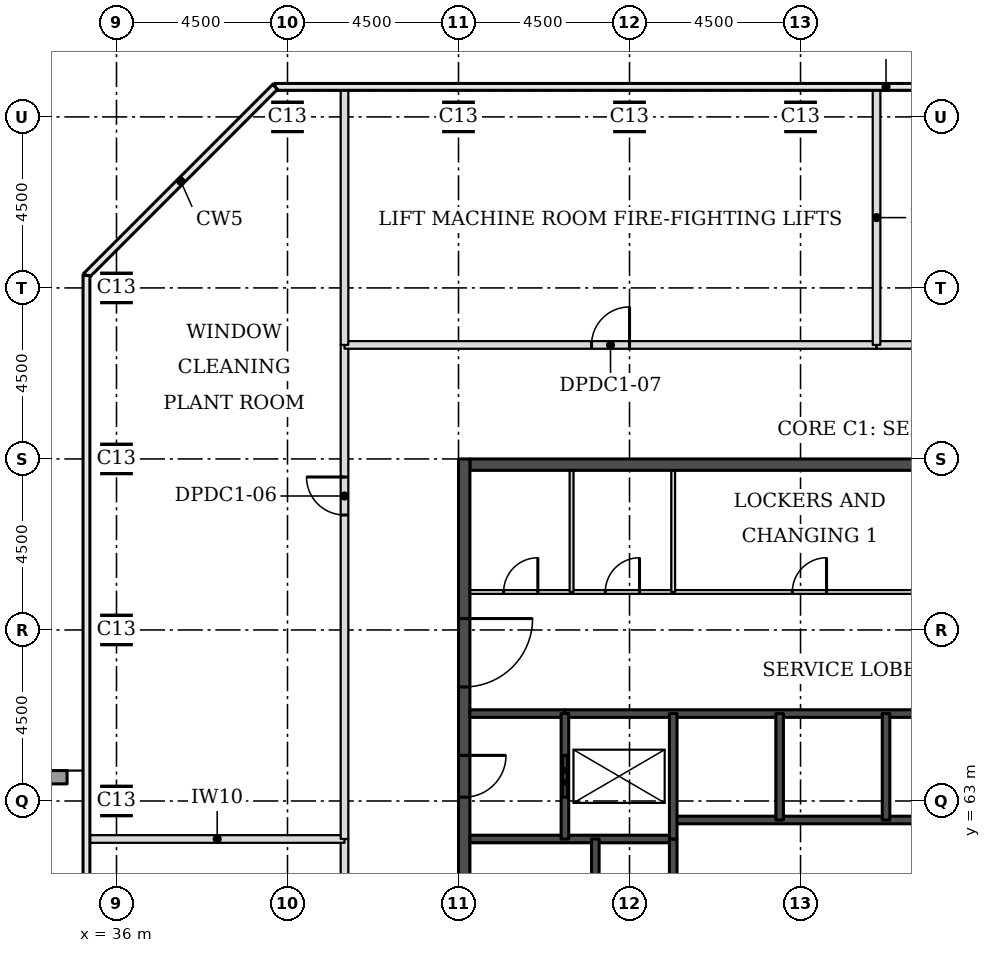
"""IFC4 building model, lengths in metres.
Left out: names, types, materials, properties, quantities, classifications, styles, units other than length and angle.
Written with IfcOpenShell. Run it as: python <this file> out.ifc"""

import sys

from ifc_helpers import new_model, si_unit, direction, frame, frame_2d, origin, origin_2d, place, context, subcontext, project, spatial, rectangle, extrude, element, fill, save


model = new_model("IFC4")
c1 = context("Model", 3, precision=1e-05, world=origin(), true_north=direction((0.0, 1.0)))
c2 = subcontext(c1, "Body", "Model", "MODEL_VIEW")
j1 = project(units=[si_unit("LENGTHUNIT", "METRE"), si_unit("PLANEANGLEUNIT", "RADIAN")], contexts=[c1])
p1 = place(None, origin())
s1 = spatial("IfcSite", under=j1, at=p1, CompositionType="ELEMENT")
p2 = place(p1, origin())
s2 = spatial("IfcBuilding", under=s1, at=p2, CompositionType="ELEMENT")
p3 = place(p2, frame((0.0, 0.0, 263.7)))
s3 = spatial("IfcBuildingStorey", under=s2, at=p3, CompositionType="ELEMENT", Elevation=263.7)
for number, where, z_axis, x_axis in (
    (1, (36.0, 63.0, 0.0), (0.0, 0.0, 1.0), (1.0, 0.0, 0.0)),
    (2, (36.0, 67.5, 0.0), (0.0, 0.0, 1.0), (1.0, 0.0, 0.0)),
    (3, (36.0, 72.0, 0.0), (0.0, 0.0, 1.0), (1.0, 0.0, 0.0)),
    (4, (36.0, 76.5, 0.0), (0.0, 0.0, 1.0), (1.0, 0.0, 0.0)),
    (5, (40.5, 81.0, 0.0), (0.0, 0.0, 1.0), (1.0, 0.0, 0.0)),
    (6, (45.0, 81.0, 0.0), (0.0, 0.0, 1.0), (1.0, 0.0, 0.0)),
    (7, (49.5, 81.0, 0.0), (0.0, 0.0, 1.0), (1.0, 0.0, 0.0)),
    (8, (54.0, 81.0, 0.0), (0.0, 0.0, 1.0), (1.0, 0.0, 0.0)),
):
    element("IfcColumn", number, at=place(p3, frame(where, z_axis=z_axis, x_axis=x_axis)), inside=s3, PredefinedType="COLUMN", context=c2, shape_type="SweptSolid", body=[
        extrude(rectangle(XDim=0.7, YDim=0.7, at=origin_2d()), origin(), (0.0, 0.0, 1.0), 5.0),
    ])
p4 = place(p3, frame((45.3, 71.85, 0.0), z_axis=(0.0, 0.0, 1.0), x_axis=(1.0, 0.0, 0.0)))
e9 = element("IfcWall", 9, at=p4, inside=s3, PredefinedType="SHEAR", context=c2, shape_type="SweptSolid", body=[
    extrude(rectangle(XDim=21.9, YDim=0.3, at=frame_2d((10.95, 0.0))), origin(), (0.0, 0.0, 1.0), 5.0),
])
p5 = place(p3, frame((45.15, 49.5, 0.0), z_axis=(0.0, 0.0, 1.0), x_axis=(0.0, 1.0, 0.0)))
e10 = element("IfcWall", 10, at=p5, inside=s3, PredefinedType="SHEAR", context=c2, shape_type="SweptSolid", body=[
    extrude(rectangle(XDim=22.5, YDim=0.3, at=frame_2d((11.25, 0.0))), origin(), (0.0, 0.0, 1.0), 5.0),
])
p6 = place(p5, frame((4.2, 0.0, 0.0)))
e11 = element("IfcOpeningElement", 11, at=p6, cuts=e10, PredefinedType="OPENING", context=c2, shape_type="SweptSolid", body=[
    extrude(rectangle(XDim=1.8, YDim=2.1, at=frame_2d((0.9, 1.05))), frame((0.0, 0.16, 0.0), z_axis=(0.0, -1.0, 0.0), x_axis=(1.0, 0.0, 0.0)), (0.0, 0.0, 1.0), 0.32),
])
p7 = place(p5, frame((6.9, 0.0, 0.0)))
e12 = element("IfcOpeningElement", 12, at=p7, cuts=e10, PredefinedType="OPENING", context=c2, shape_type="SweptSolid", body=[
    extrude(rectangle(XDim=1.1, YDim=2.1, at=frame_2d((0.55, 1.05))), frame((0.0, 0.16, 0.0), z_axis=(0.0, -1.0, 0.0), x_axis=(1.0, 0.0, 0.0)), (0.0, 0.0, 1.0), 0.32),
])
p8 = place(p5, frame((13.6, 0.0, 0.0)))
e13 = element("IfcOpeningElement", 13, at=p8, cuts=e10, PredefinedType="OPENING", context=c2, shape_type="SweptSolid", body=[
    extrude(rectangle(XDim=1.1, YDim=2.1, at=frame_2d((0.55, 1.05))), frame((0.0, 0.16, 0.0), z_axis=(0.0, -1.0, 0.0), x_axis=(1.0, 0.0, 0.0)), (0.0, 0.0, 1.0), 0.32),
])
p9 = place(p5, frame((16.5, 0.0, 0.0)))
e14 = element("IfcOpeningElement", 14, at=p9, cuts=e10, PredefinedType="OPENING", context=c2, shape_type="SweptSolid", body=[
    extrude(rectangle(XDim=1.8, YDim=2.1, at=frame_2d((0.9, 1.05))), frame((0.0, 0.16, 0.0), z_axis=(0.0, -1.0, 0.0), x_axis=(1.0, 0.0, 0.0)), (0.0, 0.0, 1.0), 0.32),
])
p10 = place(p3, frame((17.741, 63.625, 0.0), z_axis=(0.0, 0.0, 1.0), x_axis=(1.0, 0.0, 0.0)))
e15 = element("IfcWall", 15, at=p10, inside=s3, PredefinedType="PARAPET", context=c2, shape_type="SweptSolid", body=[
    extrude(rectangle(XDim=16.959, YDim=0.35, at=frame_2d((8.479, 0.0))), origin(), (0.0, 0.0, 1.0), 1.1),
])
p11 = place(p3, frame((42.0, 46.5, 0.0), z_axis=(0.0, 0.0, 1.0), x_axis=(0.0, 1.0, 0.0)))
e16 = element("IfcWall", 16, at=p11, inside=s3, PredefinedType="PARTITIONING", context=c2, shape_type="SweptSolid", body=[
    extrude(rectangle(XDim=15.5, YDim=0.2, at=frame_2d((7.75, 0.0))), origin(), (0.0, 0.0, 1.0), 4.75),
])
p12 = place(p11, frame((7.25, 0.0, 0.0)))
e17 = element("IfcOpeningElement", 17, at=p12, cuts=e16, PredefinedType="OPENING", context=c2, shape_type="SweptSolid", body=[
    extrude(rectangle(XDim=1.0, YDim=2.1, at=frame_2d((0.5, 1.05))), frame((0.0, 0.11, 0.0), z_axis=(0.0, -1.0, 0.0), x_axis=(1.0, 0.0, 0.0)), (0.0, 0.0, 1.0), 0.22),
])
p13 = place(p3, frame((35.3, 62.0, 0.0), z_axis=(0.0, 0.0, 1.0), x_axis=(1.0, 0.0, 0.0)))
e18 = element("IfcWall", 18, at=p13, inside=s3, PredefinedType="PARTITIONING", context=c2, shape_type="SweptSolid", body=[
    extrude(rectangle(XDim=6.7, YDim=0.2, at=frame_2d((3.35, 0.0))), origin(), (0.0, 0.0, 1.0), 4.75),
])
p14 = place(p3, frame((42.0, 62.0, 0.0), z_axis=(0.0, 0.0, 1.0), x_axis=(0.0, 1.0, 0.0)))
e19 = element("IfcWall", 19, at=p14, inside=s3, PredefinedType="PARTITIONING", context=c2, shape_type="SweptSolid", body=[
    extrude(rectangle(XDim=13.0, YDim=0.2, at=frame_2d((6.5, 0.0))), origin(), (0.0, 0.0, 1.0), 4.75),
])
p15 = place(p14, frame((8.525, 0.0, 0.0)))
e20 = element("IfcOpeningElement", 20, at=p15, cuts=e19, PredefinedType="OPENING", context=c2, shape_type="SweptSolid", body=[
    extrude(rectangle(XDim=1.0, YDim=2.1, at=frame_2d((0.5, 1.05))), frame((0.0, 0.11, 0.0), z_axis=(0.0, -1.0, 0.0), x_axis=(1.0, 0.0, 0.0)), (0.0, 0.0, 1.0), 0.22),
])
p16 = place(p3, frame((42.0, 75.0, 0.0), z_axis=(0.0, 0.0, 1.0), x_axis=(1.0, 0.0, 0.0)))
e21 = element("IfcWall", 21, at=p16, inside=s3, PredefinedType="PARTITIONING", context=c2, shape_type="SweptSolid", body=[
    extrude(rectangle(XDim=14.0, YDim=0.2, at=frame_2d((7.0, 0.0))), origin(), (0.0, 0.0, 1.0), 4.75),
])
p17 = place(p16, frame((6.5, 0.0, 0.0)))
e22 = element("IfcOpeningElement", 22, at=p17, cuts=e21, PredefinedType="OPENING", context=c2, shape_type="SweptSolid", body=[
    extrude(rectangle(XDim=1.0, YDim=2.1, at=frame_2d((0.5, 1.05))), frame((0.0, 0.11, 0.0), z_axis=(0.0, -1.0, 0.0), x_axis=(1.0, 0.0, 0.0)), (0.0, 0.0, 1.0), 0.22),
])
p18 = place(p3, frame((42.0, 75.0, 0.0), z_axis=(0.0, 0.0, 1.0), x_axis=(0.0, 1.0, 0.0)))
e23 = element("IfcWall", 23, at=p18, inside=s3, PredefinedType="PARTITIONING", context=c2, shape_type="SweptSolid", body=[
    extrude(rectangle(XDim=6.7, YDim=0.2, at=frame_2d((3.35, 0.0))), origin(), (0.0, 0.0, 1.0), 4.75),
])
p19 = place(p3, frame((56.0, 75.0, 0.0), z_axis=(0.0, 0.0, 1.0), x_axis=(1.0, 0.0, 0.0)))
e24 = element("IfcWall", 24, at=p19, inside=s3, PredefinedType="PARTITIONING", context=c2, shape_type="SweptSolid", body=[
    extrude(rectangle(XDim=14.5, YDim=0.2, at=frame_2d((7.25, 0.0))), origin(), (0.0, 0.0, 1.0), 4.75),
])
p20 = place(p19, frame((8.869, 0.0, 0.0)))
e25 = element("IfcOpeningElement", 25, at=p20, cuts=e24, PredefinedType="OPENING", context=c2, shape_type="SweptSolid", body=[
    extrude(rectangle(XDim=1.8, YDim=2.1, at=frame_2d((0.9, 1.05))), frame((0.0, 0.11, 0.0), z_axis=(0.0, -1.0, 0.0), x_axis=(1.0, 0.0, 0.0)), (0.0, 0.0, 1.0), 0.22),
])
p21 = place(p3, frame((56.0, 75.0, 0.0), z_axis=(0.0, 0.0, 1.0), x_axis=(0.0, 1.0, 0.0)))
e26 = element("IfcWall", 26, at=p21, inside=s3, PredefinedType="PARTITIONING", context=c2, shape_type="SweptSolid", body=[
    extrude(rectangle(XDim=6.7, YDim=0.2, at=frame_2d((3.35, 0.0))), origin(), (0.0, 0.0, 1.0), 4.75),
])
p22 = place(p3, frame((45.3, 62.0, 0.0), z_axis=(0.0, 0.0, 1.0), x_axis=(1.0, 0.0, 0.0)))
e27 = element("IfcWall", 27, at=p22, inside=s3, PredefinedType="SOLIDWALL", context=c2, shape_type="SweptSolid", body=[
    extrude(rectangle(XDim=5.35, YDim=0.2, at=frame_2d((2.675, 0.0))), origin(), (0.0, 0.0, 1.0), 4.75),
])
p23 = place(p3, frame((50.65, 62.5, 0.0), z_axis=(0.0, 0.0, 1.0), x_axis=(1.0, 0.0, 0.0)))
e28 = element("IfcWall", 28, at=p23, inside=s3, PredefinedType="SOLIDWALL", context=c2, shape_type="SweptSolid", body=[
    extrude(rectangle(XDim=11.2, YDim=0.2, at=frame_2d((5.6, 0.0))), origin(), (0.0, 0.0, 1.0), 4.75),
])
p24 = place(p3, frame((45.3, 65.3, 0.0), z_axis=(0.0, 0.0, 1.0), x_axis=(1.0, 0.0, 0.0)))
e29 = element("IfcWall", 29, at=p24, inside=s3, PredefinedType="SOLIDWALL", context=c2, shape_type="SweptSolid", body=[
    extrude(rectangle(XDim=2.5, YDim=0.2, at=frame_2d((1.25, 0.0))), origin(), (0.0, 0.0, 1.0), 4.75),
])
p25 = place(p3, frame((47.8, 65.3, 0.0), z_axis=(0.0, 0.0, 1.0), x_axis=(1.0, 0.0, 0.0)))
e30 = element("IfcWall", 30, at=p25, inside=s3, PredefinedType="SOLIDWALL", context=c2, shape_type="SweptSolid", body=[
    extrude(rectangle(XDim=16.9, YDim=0.2, at=frame_2d((8.45, 0.0))), origin(), (0.0, 0.0, 1.0), 4.75),
])
p26 = place(p3, frame((45.3, 68.5, 0.0), z_axis=(0.0, 0.0, 1.0), x_axis=(1.0, 0.0, 0.0)))
e31 = element("IfcWall", 31, at=p26, inside=s3, PredefinedType="PARTITIONING", context=c2, shape_type="SweptSolid", body=[
    extrude(rectangle(XDim=21.9, YDim=0.1, at=frame_2d((10.95, 0.0))), origin(), (0.0, 0.0, 1.0), 4.75),
])
p27 = place(p26, frame((18.775, 0.0, 0.0)))
e32 = element("IfcOpeningElement", 32, at=p27, cuts=e31, PredefinedType="OPENING", context=c2, shape_type="SweptSolid", body=[
    extrude(rectangle(XDim=0.9, YDim=2.1, at=frame_2d((0.45, 1.05))), frame((0.0, 0.06, 0.0), z_axis=(0.0, -1.0, 0.0), x_axis=(1.0, 0.0, 0.0)), (0.0, 0.0, 1.0), 0.12),
])
p28 = place(p26, frame((0.887, 0.0, 0.0)))
e33 = element("IfcOpeningElement", 33, at=p28, cuts=e31, PredefinedType="OPENING", context=c2, shape_type="SweptSolid", body=[
    extrude(rectangle(XDim=0.9, YDim=2.1, at=frame_2d((0.45, 1.05))), frame((0.0, 0.06, 0.0), z_axis=(0.0, -1.0, 0.0), x_axis=(1.0, 0.0, 0.0)), (0.0, 0.0, 1.0), 0.12),
])
p29 = place(p26, frame((3.562, 0.0, 0.0)))
e34 = element("IfcOpeningElement", 34, at=p29, cuts=e31, PredefinedType="OPENING", context=c2, shape_type="SweptSolid", body=[
    extrude(rectangle(XDim=0.9, YDim=2.1, at=frame_2d((0.45, 1.05))), frame((0.0, 0.06, 0.0), z_axis=(0.0, -1.0, 0.0), x_axis=(1.0, 0.0, 0.0)), (0.0, 0.0, 1.0), 0.12),
])
p30 = place(p26, frame((14.084, 0.0, 0.0)))
e35 = element("IfcOpeningElement", 35, at=p30, cuts=e31, PredefinedType="OPENING", context=c2, shape_type="SweptSolid", body=[
    extrude(rectangle(XDim=0.9, YDim=2.1, at=frame_2d((0.45, 1.05))), frame((0.0, 0.06, 0.0), z_axis=(0.0, -1.0, 0.0), x_axis=(1.0, 0.0, 0.0)), (0.0, 0.0, 1.0), 0.12),
])
p31 = place(p26, frame((8.484, 0.0, 0.0)))
e36 = element("IfcOpeningElement", 36, at=p31, cuts=e31, PredefinedType="OPENING", context=c2, shape_type="SweptSolid", body=[
    extrude(rectangle(XDim=0.9, YDim=2.1, at=frame_2d((0.45, 1.05))), frame((0.0, 0.06, 0.0), z_axis=(0.0, -1.0, 0.0), x_axis=(1.0, 0.0, 0.0)), (0.0, 0.0, 1.0), 0.12),
])
p32 = place(p3, frame((47.8, 62.0, 0.0), z_axis=(0.0, 0.0, 1.0), x_axis=(0.0, 1.0, 0.0)))
e37 = element("IfcWall", 37, at=p32, inside=s3, PredefinedType="SOLIDWALL", context=c2, shape_type="SweptSolid", body=[
    extrude(rectangle(XDim=3.3, YDim=0.2, at=frame_2d((1.65, 0.0))), origin(), (0.0, 0.0, 1.0), 4.75),
])
p33 = place(p32, frame((1.1, 0.0, 0.0)))
e38 = element("IfcOpeningElement", 38, at=p33, cuts=e37, PredefinedType="OPENING", context=c2, shape_type="SweptSolid", body=[
    extrude(rectangle(XDim=1.1, YDim=2.1, at=frame_2d((0.55, 1.05))), frame((0.0, 0.11, 0.0), z_axis=(0.0, -1.0, 0.0), x_axis=(1.0, 0.0, 0.0)), (0.0, 0.0, 1.0), 0.22),
])
p34 = place(p3, frame((47.975, 68.5, 0.0), z_axis=(0.0, 0.0, 1.0), x_axis=(0.0, 1.0, 0.0)))
e39 = element("IfcWall", 39, at=p34, inside=s3, PredefinedType="PARTITIONING", context=c2, shape_type="SweptSolid", body=[
    extrude(rectangle(XDim=3.2, YDim=0.1, at=frame_2d((1.6, 0.0))), origin(), (0.0, 0.0, 1.0), 4.75),
])
p35 = place(p3, frame((48.6, 56.2, 0.0), z_axis=(0.0, 0.0, 1.0), x_axis=(0.0, 1.0, 0.0)))
e40 = element("IfcWall", 40, at=p35, inside=s3, PredefinedType="SOLIDWALL", context=c2, shape_type="SweptSolid", body=[
    extrude(rectangle(XDim=5.8, YDim=0.2, at=frame_2d((2.9, 0.0))), origin(), (0.0, 0.0, 1.0), 4.75),
])
p36 = place(p3, frame((50.65, 68.5, 0.0), z_axis=(0.0, 0.0, 1.0), x_axis=(0.0, 1.0, 0.0)))
e41 = element("IfcWall", 41, at=p36, inside=s3, PredefinedType="PARTITIONING", context=c2, shape_type="SweptSolid", body=[
    extrude(rectangle(XDim=3.2, YDim=0.1, at=frame_2d((1.6, 0.0))), origin(), (0.0, 0.0, 1.0), 4.75),
])
p37 = place(p3, frame((50.65, 59.0, 0.0), z_axis=(0.0, 0.0, 1.0), x_axis=(0.0, 1.0, 0.0)))
e42 = element("IfcWall", 42, at=p37, inside=s3, PredefinedType="SOLIDWALL", context=c2, shape_type="SweptSolid", body=[
    extrude(rectangle(XDim=3.0, YDim=0.2, at=frame_2d((1.5, 0.0))), origin(), (0.0, 0.0, 1.0), 4.75),
])
p38 = place(p3, frame((50.65, 62.0, 0.0), z_axis=(0.0, 0.0, 1.0), x_axis=(0.0, 1.0, 0.0)))
e43 = element("IfcWall", 43, at=p38, inside=s3, PredefinedType="SOLIDWALL", context=c2, shape_type="SweptSolid", body=[
    extrude(rectangle(XDim=3.3, YDim=0.2, at=frame_2d((1.65, 0.0))), origin(), (0.0, 0.0, 1.0), 4.75),
])
for number, where, z_axis, x_axis in (
    (44, (53.45, 62.5, 0.0), (0.0, 0.0, 1.0), (0.0, 1.0, 0.0)),
    (45, (56.25, 62.5, 0.0), (0.0, 0.0, 1.0), (0.0, 1.0, 0.0)),
):
    element("IfcWall", number, at=place(p3, frame(where, z_axis=z_axis, x_axis=x_axis)), inside=s3, PredefinedType="SOLIDWALL", context=c2, shape_type="SweptSolid", body=[
        extrude(rectangle(XDim=2.8, YDim=0.2, at=frame_2d((1.4, 0.0))), origin(), (0.0, 0.0, 1.0), 4.75),
    ])
p39 = place(p17, origin())
e46 = element("IfcDoor", 46, at=p39, inside=s3, OperationType="SINGLE_SWING_RIGHT", PredefinedType="DOOR", context=c2, shape_type="SweptSolid", body=[
    extrude(rectangle(XDim=1.0, YDim=2.1, at=frame_2d((0.5, 1.05))), frame((0.0, 0.025, 0.0), z_axis=(0.0, -1.0, 0.0), x_axis=(1.0, 0.0, 0.0)), (0.0, 0.0, 1.0), 0.05),
])
fill(e22, e46)
p40 = place(p15, origin())
e47 = element("IfcDoor", 47, at=p40, inside=s3, OperationType="SINGLE_SWING_RIGHT", PredefinedType="DOOR", context=c2, shape_type="SweptSolid", body=[
    extrude(rectangle(XDim=1.0, YDim=2.1, at=frame_2d((0.5, 1.05))), frame((0.0, 0.025, 0.0), z_axis=(0.0, -1.0, 0.0), x_axis=(1.0, 0.0, 0.0)), (0.0, 0.0, 1.0), 0.05),
])
fill(e20, e47)
p41 = place(p33, origin())
e48 = element("IfcDoor", 48, at=p41, inside=s3, OperationType="DOUBLE_DOOR_SLIDING", PredefinedType="DOOR", context=c2, shape_type="SweptSolid", body=[
    extrude(rectangle(XDim=1.1, YDim=2.1, at=frame_2d((0.55, 1.05))), frame((0.0, 0.025, 0.0), z_axis=(0.0, -1.0, 0.0), x_axis=(1.0, 0.0, 0.0)), (0.0, 0.0, 1.0), 0.05),
])
fill(e38, e48)
p42 = place(p8, frame((1.1, 0.0, 0.0), z_axis=(0.0, 0.0, 1.0), x_axis=(-1.0, 0.0, 0.0)))
e49 = element("IfcDoor", 49, at=p42, inside=s3, OperationType="SINGLE_SWING_LEFT", PredefinedType="DOOR", context=c2, shape_type="SweptSolid", body=[
    extrude(rectangle(XDim=1.1, YDim=2.1, at=frame_2d((0.55, 1.05))), frame((0.0, 0.025, 0.0), z_axis=(0.0, -1.0, 0.0), x_axis=(1.0, 0.0, 0.0)), (0.0, 0.0, 1.0), 0.05),
])
fill(e13, e49)
p43 = place(p9, frame((1.8, 0.0, 0.0), z_axis=(0.0, 0.0, 1.0), x_axis=(-1.0, 0.0, 0.0)))
e50 = element("IfcDoor", 50, at=p43, inside=s3, OperationType="SINGLE_SWING_LEFT", PredefinedType="DOOR", context=c2, shape_type="SweptSolid", body=[
    extrude(rectangle(XDim=1.8, YDim=2.1, at=frame_2d((0.9, 1.05))), frame((0.0, 0.025, 0.0), z_axis=(0.0, -1.0, 0.0), x_axis=(1.0, 0.0, 0.0)), (0.0, 0.0, 1.0), 0.05),
])
fill(e14, e50)
p44 = place(p28, origin())
e51 = element("IfcDoor", 51, at=p44, inside=s3, OperationType="SINGLE_SWING_RIGHT", PredefinedType="DOOR", context=c2, shape_type="SweptSolid", body=[
    extrude(rectangle(XDim=0.9, YDim=2.1, at=frame_2d((0.45, 1.05))), frame((0.0, 0.025, 0.0), z_axis=(0.0, -1.0, 0.0), x_axis=(1.0, 0.0, 0.0)), (0.0, 0.0, 1.0), 0.05),
])
fill(e33, e51)
p45 = place(p29, origin())
e52 = element("IfcDoor", 52, at=p45, inside=s3, OperationType="SINGLE_SWING_RIGHT", PredefinedType="DOOR", context=c2, shape_type="SweptSolid", body=[
    extrude(rectangle(XDim=0.9, YDim=2.1, at=frame_2d((0.45, 1.05))), frame((0.0, 0.025, 0.0), z_axis=(0.0, -1.0, 0.0), x_axis=(1.0, 0.0, 0.0)), (0.0, 0.0, 1.0), 0.05),
])
fill(e34, e52)
p46 = place(p31, origin())
e53 = element("IfcDoor", 53, at=p46, inside=s3, OperationType="SINGLE_SWING_RIGHT", PredefinedType="DOOR", context=c2, shape_type="SweptSolid", body=[
    extrude(rectangle(XDim=0.9, YDim=2.1, at=frame_2d((0.45, 1.05))), frame((0.0, 0.025, 0.0), z_axis=(0.0, -1.0, 0.0), x_axis=(1.0, 0.0, 0.0)), (0.0, 0.0, 1.0), 0.05),
])
fill(e36, e53)
save(model, sys.argv[1])
